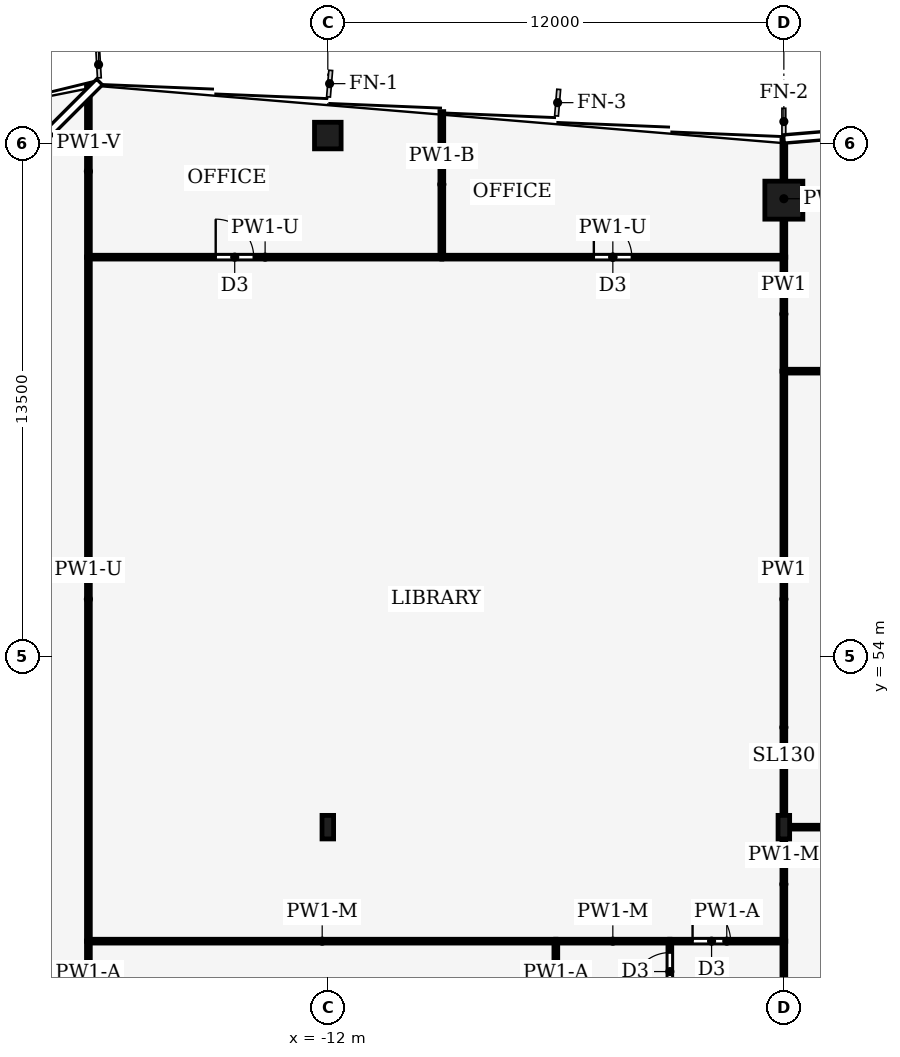
"""IFC4 building model, lengths in metres.
Left out: names, types, materials, properties, quantities, classifications, styles, units other than length and angle.
Written with IfcOpenShell. Run it as: python <this file> out.ifc"""

import sys

from ifc_helpers import new_model, si_unit, direction, frame, frame_2d, origin, origin_2d, place, context, subcontext, project, spatial, rectangle, hollow_rectangle, i_section, extrude, element, fill, save


model = new_model("IFC4")
c1 = context("Model", 3, precision=1e-05, world=origin(), true_north=direction((0.0, 1.0)))
c2 = subcontext(c1, "Body", "Model", "MODEL_VIEW")
j1 = project(units=[si_unit("LENGTHUNIT", "METRE"), si_unit("PLANEANGLEUNIT", "RADIAN")], contexts=[c1])
p1 = place(None, origin())
s1 = spatial("IfcSite", under=j1, at=p1, CompositionType="ELEMENT")
p2 = place(p1, origin())
s2 = spatial("IfcBuilding", under=s1, at=p2, CompositionType="ELEMENT")
p3 = place(p2, frame((0.0, 0.0, 177.0)))
s3 = spatial("IfcBuildingStorey", under=s2, at=p3, CompositionType="ELEMENT", Elevation=177.0)
p4 = place(p3, frame((0.0, 66.0, 0.0), z_axis=(0.0, 0.0, 1.0), x_axis=(1.0, 0.0, 0.0)))
e1 = element("IfcColumn", 1, at=p4, inside=s3, PredefinedType="COLUMN", context=c2, shape_type="SweptSolid", body=[
    extrude(hollow_rectangle(XDim=1.0, YDim=1.0, WallThickness=0.06, at=origin_2d()), origin(), (0.0, 0.0, 1.0), 5.0),
])
p5 = place(p3, frame((-12.0, 67.7, 0.0), z_axis=(0.0, 0.0, 1.0), x_axis=(1.0, 0.0, 0.0)))
e2 = element("IfcColumn", 2, at=p5, inside=s3, PredefinedType="COLUMN", context=c2, shape_type="SweptSolid", body=[
    extrude(hollow_rectangle(XDim=0.7, YDim=0.7, WallThickness=0.03, at=origin_2d()), origin(), (0.0, 0.0, 1.0), 5.0),
])
for number, where, z_axis, x_axis in (
    (3, (-12.0, 49.5, 0.0), (0.0, 0.0, 1.0), (1.0, 0.0, 0.0)),
    (4, (0.0, 49.5, 0.0), (0.0, 0.0, 1.0), (1.0, 0.0, 0.0)),
):
    element("IfcColumn", number, at=place(p3, frame(where, z_axis=z_axis, x_axis=x_axis)), inside=s3, PredefinedType="COLUMN", context=c2, shape_type="SweptSolid", body=[
        extrude(i_section(OverallWidth=0.305, OverallDepth=0.62, WebThickness=0.021, FlangeThickness=0.04, FilletRadius=0.027, at=origin_2d()), origin(), (0.0, 0.0, 1.0), 5.0),
    ])
p6 = place(p3, frame((-6.0, 43.3, 0.0), z_axis=(0.0, 0.0, 1.0), x_axis=(0.0, 1.0, 0.0)))
e5 = element("IfcWall", 5, at=p6, inside=s3, PredefinedType="PARTITIONING", context=c2, shape_type="SweptSolid", body=[
    extrude(rectangle(XDim=3.2, YDim=0.1, at=frame_2d((1.6, 0.0))), origin(), (0.0, 0.0, 1.0), 4.87),
])
p7 = place(p3, frame((-5.996, 46.5, 0.0), z_axis=(0.0, 0.0, 1.0), x_axis=(-1.0, 0.0, 0.0)))
e6 = element("IfcWall", 6, at=p7, inside=s3, PredefinedType="PARTITIONING", context=c2, shape_type="SweptSolid", body=[
    extrude(rectangle(XDim=12.304, YDim=0.1, at=frame_2d((6.152, 0.0))), origin(), (0.0, 0.0, 1.0), 4.44),
])
p8 = place(p3, frame((-18.3, 46.504, 0.0), z_axis=(0.0, 0.0, 1.0), x_axis=(0.0, -1.0, 0.0)))
e7 = element("IfcWall", 7, at=p8, inside=s3, PredefinedType="PARTITIONING", context=c2, shape_type="SweptSolid", body=[
    extrude(rectangle(XDim=3.208, YDim=0.1, at=frame_2d((1.604, 0.0))), origin(), (0.0, 0.0, 1.0), 4.87),
])
p9 = place(p3, frame((-3.0, 43.3, 0.0), z_axis=(0.0, 0.0, 1.0), x_axis=(0.0, 1.0, 0.0)))
e8 = element("IfcWall", 8, at=p9, inside=s3, PredefinedType="PARTITIONING", context=c2, shape_type="SweptSolid", body=[
    extrude(rectangle(XDim=3.2, YDim=0.1, at=frame_2d((1.6, 0.0))), origin(), (0.0, 0.0, 1.0), 4.87),
])
p10 = place(p9, frame((1.9, 0.0, 0.0)))
e9 = element("IfcOpeningElement", 9, at=p10, cuts=e8, PredefinedType="OPENING", context=c2, shape_type="SweptSolid", body=[
    extrude(rectangle(XDim=1.0, YDim=2.1, at=frame_2d((0.5, 1.05))), frame((0.0, 0.06, 0.0), z_axis=(0.0, -1.0, 0.0), x_axis=(1.0, 0.0, 0.0)), (0.0, 0.0, 1.0), 0.12),
])
p11 = place(p3, frame((-2.996, 46.5, 0.0), z_axis=(0.0, 0.0, 1.0), x_axis=(-1.0, 0.0, 0.0)))
e10 = element("IfcWall", 10, at=p11, inside=s3, PredefinedType="PARTITIONING", context=c2, shape_type="SweptSolid", body=[
    extrude(rectangle(XDim=3.008, YDim=0.1, at=frame_2d((1.504, 0.0))), origin(), (0.0, 0.0, 1.0), 4.44),
])
p12 = place(p3, frame((-3.004, 46.5, 0.0), z_axis=(0.0, 0.0, 1.0), x_axis=(1.0, 0.0, 0.0)))
e11 = element("IfcWall", 11, at=p12, inside=s3, PredefinedType="PARTITIONING", context=c2, shape_type="SweptSolid", body=[
    extrude(rectangle(XDim=3.004, YDim=0.1, at=frame_2d((1.502, 0.0))), origin(), (0.0, 0.0, 1.0), 4.87),
])
p13 = place(p12, frame((0.602, 0.0, 0.0)))
e12 = element("IfcOpeningElement", 12, at=p13, cuts=e11, PredefinedType="OPENING", context=c2, shape_type="SweptSolid", body=[
    extrude(rectangle(XDim=1.0, YDim=2.1, at=frame_2d((0.5, 1.05))), frame((0.0, 0.06, 0.0), z_axis=(0.0, -1.0, 0.0), x_axis=(1.0, 0.0, 0.0)), (0.0, 0.0, 1.0), 0.12),
])
p14 = place(p3, frame((0.0, 43.3, 0.0), z_axis=(0.0, 0.0, 1.0), x_axis=(0.0, 1.0, 0.0)))
e13 = element("IfcWall", 13, at=p14, inside=s3, PredefinedType="PARTITIONING", context=c2, shape_type="SweptSolid", body=[
    extrude(rectangle(XDim=3.204, YDim=0.1, at=frame_2d((1.602, 0.0))), origin(), (0.0, 0.0, 1.0), 4.44),
])
p15 = place(p3, frame((-18.3, 64.5, 0.0), z_axis=(0.0, 0.0, 1.0), x_axis=(1.0, 0.0, 0.0)))
e14 = element("IfcWall", 14, at=p15, inside=s3, PredefinedType="PARTITIONING", context=c2, shape_type="SweptSolid", body=[
    extrude(rectangle(XDim=9.3, YDim=0.1, at=frame_2d((4.65, 0.0))), origin(), (0.0, 0.0, 1.0), 4.24),
])
p16 = place(p15, frame((3.35, 0.0, 0.0)))
e15 = element("IfcOpeningElement", 15, at=p16, cuts=e14, PredefinedType="OPENING", context=c2, shape_type="SweptSolid", body=[
    extrude(rectangle(XDim=1.0, YDim=2.1, at=frame_2d((0.5, 1.05))), frame((0.0, 0.06, 0.0), z_axis=(0.0, -1.0, 0.0), x_axis=(1.0, 0.0, 0.0)), (0.0, 0.0, 1.0), 0.12),
])
p17 = place(p3, frame((-9.0, 64.5, 0.0), z_axis=(0.0, 0.0, 1.0), x_axis=(1.0, 0.0, 0.0)))
e16 = element("IfcWall", 16, at=p17, inside=s3, PredefinedType="PARTITIONING", context=c2, shape_type="SweptSolid", body=[
    extrude(rectangle(XDim=9.0, YDim=0.1, at=frame_2d((4.5, 0.0))), origin(), (0.0, 0.0, 1.0), 4.24),
])
p18 = place(p17, frame((4.0, 0.0, 0.0)))
e17 = element("IfcOpeningElement", 17, at=p18, cuts=e16, PredefinedType="OPENING", context=c2, shape_type="SweptSolid", body=[
    extrude(rectangle(XDim=1.0, YDim=2.1, at=frame_2d((0.5, 1.05))), frame((0.0, 0.06, 0.0), z_axis=(0.0, -1.0, 0.0), x_axis=(1.0, 0.0, 0.0)), (0.0, 0.0, 1.0), 0.12),
])
p19 = place(p3, frame((0.0, 46.496, 0.0), z_axis=(0.0, 0.0, 1.0), x_axis=(0.0, 1.0, 0.0)))
e18 = element("IfcWall", 18, at=p19, inside=s3, PredefinedType="PARTITIONING", context=c2, shape_type="SweptSolid", body=[
    extrude(rectangle(XDim=3.004, YDim=0.1, at=frame_2d((1.502, 0.0))), origin(), (0.0, 0.0, 1.0), 4.44),
])
p20 = place(p3, frame((0.0, 49.5, 0.0), z_axis=(0.0, 0.0, 1.0), x_axis=(0.0, 1.0, 0.0)))
e19 = element("IfcWall", 19, at=p20, inside=s3, PredefinedType="PARTITIONING", context=c2, shape_type="SweptSolid", body=[
    extrude(rectangle(XDim=12.0, YDim=0.1, at=frame_2d((6.0, 0.0))), origin(), (0.0, 0.0, 1.0), 4.29),
])
p21 = place(p3, frame((0.0, 61.5, 0.0), z_axis=(0.0, 0.0, 1.0), x_axis=(0.0, 1.0, 0.0)))
e20 = element("IfcWall", 20, at=p21, inside=s3, PredefinedType="PARTITIONING", context=c2, shape_type="SweptSolid", body=[
    extrude(rectangle(XDim=3.004, YDim=0.1, at=frame_2d((1.502, 0.0))), origin(), (0.0, 0.0, 1.0), 4.29),
])
p22 = place(p3, frame((-18.3, 64.504, 0.0), z_axis=(0.0, 0.0, 1.0), x_axis=(0.0, -1.0, 0.0)))
e21 = element("IfcWall", 21, at=p22, inside=s3, PredefinedType="PARTITIONING", context=c2, shape_type="SweptSolid", body=[
    extrude(rectangle(XDim=18.008, YDim=0.1, at=frame_2d((9.004, 0.0))), origin(), (0.0, 0.0, 1.0), 4.24),
])
p23 = place(p3, frame((-9.0, 64.5, 0.0), z_axis=(0.0, 0.0, 1.0), x_axis=(0.0, 1.0, 0.0)))
e22 = element("IfcWall", 22, at=p23, inside=s3, PredefinedType="PARTITIONING", context=c2, shape_type="SweptSolid", body=[
    extrude(rectangle(XDim=3.83, YDim=0.1, at=frame_2d((1.915, 0.0))), origin(), (0.0, 0.0, 1.0), 4.04),
])
p24 = place(p3, frame((-18.3, 69.02, 0.0), z_axis=(0.0, 0.0, 1.0), x_axis=(0.0, -1.0, 0.0)))
e23 = element("IfcWall", 23, at=p24, inside=s3, PredefinedType="PARTITIONING", context=c2, shape_type="SweptSolid", body=[
    extrude(rectangle(XDim=4.524, YDim=0.1, at=frame_2d((2.262, 0.0))), origin(), (0.0, 0.0, 1.0), 3.93),
])
p25 = place(p3, frame((0.0, 64.496, 0.0), z_axis=(0.0, 0.0, 1.0), x_axis=(0.0, 1.0, 0.0)))
e24 = element("IfcWall", 24, at=p25, inside=s3, PredefinedType="PARTITIONING", context=c2, shape_type="SweptSolid", body=[
    extrude(rectangle(XDim=3.084, YDim=0.1, at=frame_2d((1.542, 0.0))), origin(), (0.0, 0.0, 1.0), 4.04),
])
p26 = place(p3, frame((0.0, 49.5, 0.0), z_axis=(0.0, 0.0, 1.0), x_axis=(1.0, 0.0, 0.0)))
e25 = element("IfcWall", 25, at=p26, inside=s3, PredefinedType="PARTITIONING", context=c2, shape_type="SweptSolid", body=[
    extrude(rectangle(XDim=12.004, YDim=0.1, at=frame_2d((6.002, 0.0))), origin(), (0.0, 0.0, 1.0), 4.24),
])
p27 = place(p26, frame((5.502, 0.0, 0.0)))
e26 = element("IfcOpeningElement", 26, at=p27, cuts=e25, PredefinedType="OPENING", context=c2, shape_type="SweptSolid", body=[
    extrude(rectangle(XDim=1.0, YDim=2.1, at=frame_2d((0.5, 1.05))), frame((0.0, 0.06, 0.0), z_axis=(0.0, -1.0, 0.0), x_axis=(1.0, 0.0, 0.0)), (0.0, 0.0, 1.0), 0.12),
])
p28 = place(p3, frame((0.0, 61.5, 0.0), z_axis=(0.0, 0.0, 1.0), x_axis=(1.0, 0.0, 0.0)))
e27 = element("IfcWall", 27, at=p28, inside=s3, PredefinedType="PARTITIONING", context=c2, shape_type="SweptSolid", body=[
    extrude(rectangle(XDim=9.0, YDim=0.1, at=frame_2d((4.5, 0.0))), origin(), (0.0, 0.0, 1.0), 4.24),
])
p29 = place(p28, frame((4.0, 0.0, 0.0)))
e28 = element("IfcOpeningElement", 28, at=p29, cuts=e27, PredefinedType="OPENING", context=c2, shape_type="SweptSolid", body=[
    extrude(rectangle(XDim=1.0, YDim=2.1, at=frame_2d((0.5, 1.05))), frame((0.0, 0.06, 0.0), z_axis=(0.0, -1.0, 0.0), x_axis=(1.0, 0.0, 0.0)), (0.0, 0.0, 1.0), 0.12),
])
p30 = place(p10, origin())
e29 = element("IfcDoor", 29, at=p30, inside=s3, OperationType="SINGLE_SWING_RIGHT", PredefinedType="DOOR", context=c2, shape_type="SweptSolid", body=[
    extrude(rectangle(XDim=1.0, YDim=2.1, at=frame_2d((0.5, 1.05))), frame((0.0, 0.025, 0.0), z_axis=(0.0, -1.0, 0.0), x_axis=(1.0, 0.0, 0.0)), (0.0, 0.0, 1.0), 0.05),
])
fill(e9, e29)
p31 = place(p13, origin())
e30 = element("IfcDoor", 30, at=p31, inside=s3, OperationType="SINGLE_SWING_LEFT", PredefinedType="DOOR", context=c2, shape_type="SweptSolid", body=[
    extrude(rectangle(XDim=1.0, YDim=2.1, at=frame_2d((0.5, 1.05))), frame((0.0, 0.025, 0.0), z_axis=(0.0, -1.0, 0.0), x_axis=(1.0, 0.0, 0.0)), (0.0, 0.0, 1.0), 0.05),
])
fill(e12, e30)
p32 = place(p16, origin())
e31 = element("IfcDoor", 31, at=p32, inside=s3, OperationType="SINGLE_SWING_LEFT", PredefinedType="DOOR", context=c2, shape_type="SweptSolid", body=[
    extrude(rectangle(XDim=1.0, YDim=2.1, at=frame_2d((0.5, 1.05))), frame((0.0, 0.025, 0.0), z_axis=(0.0, -1.0, 0.0), x_axis=(1.0, 0.0, 0.0)), (0.0, 0.0, 1.0), 0.05),
])
fill(e15, e31)
p33 = place(p18, origin())
e32 = element("IfcDoor", 32, at=p33, inside=s3, OperationType="SINGLE_SWING_RIGHT", PredefinedType="DOOR", context=c2, shape_type="SweptSolid", body=[
    extrude(rectangle(XDim=1.0, YDim=2.1, at=frame_2d((0.5, 1.05))), frame((0.0, 0.025, 0.0), z_axis=(0.0, -1.0, 0.0), x_axis=(1.0, 0.0, 0.0)), (0.0, 0.0, 1.0), 0.05),
])
fill(e17, e32)
save(model, sys.argv[1])
